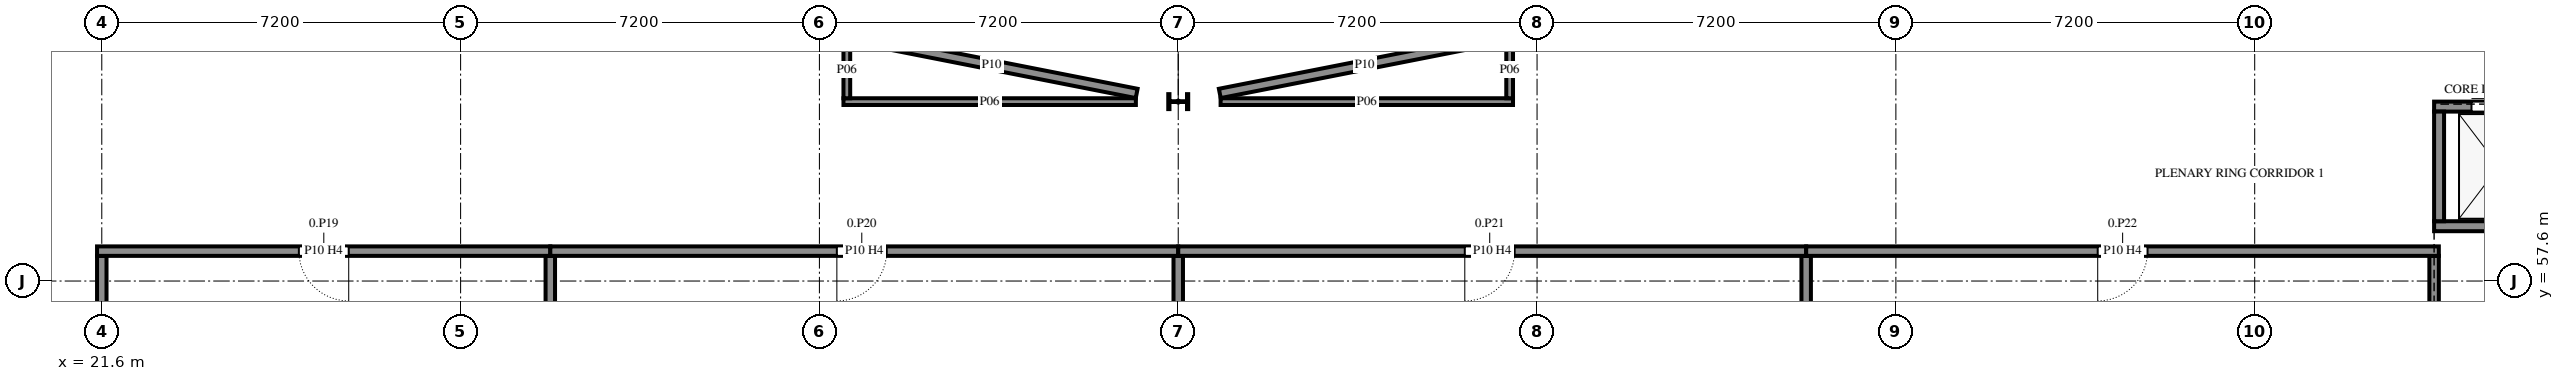
"""IFC4 building model, lengths in metres.
Left out: names, types, materials, properties, quantities, classifications, styles, units other than length and angle.
Written with IfcOpenShell. Run it as: python <this file> out.ifc"""

import sys

from ifc_helpers import new_model, si_unit, direction, frame, frame_2d, origin, origin_2d, place, context, subcontext, project, spatial, rectangle, i_section, extrude, element, fill, save


model = new_model("IFC4")
c1 = context("Model", 3, precision=1e-05, world=origin(), true_north=direction((0.0, 1.0)))
c2 = subcontext(c1, "Body", "Model", "MODEL_VIEW")
j1 = project(units=[si_unit("LENGTHUNIT", "METRE"), si_unit("PLANEANGLEUNIT", "RADIAN")], contexts=[c1])
p1 = place(None, origin())
s1 = spatial("IfcSite", under=j1, at=p1, CompositionType="ELEMENT")
p2 = place(p1, origin())
s2 = spatial("IfcBuilding", under=s1, at=p2, CompositionType="ELEMENT")
p3 = place(p2, origin())
s3 = spatial("IfcBuildingStorey", under=s2, at=p3, CompositionType="ELEMENT", Elevation=0.0)
p4 = place(p3, frame((43.2, 61.2, -0.3), z_axis=(0.0, 0.0, 1.0), x_axis=(0.0, -1.0, 0.0)))
e1 = element("IfcColumn", 1, at=p4, inside=s3, PredefinedType="COLUMN", context=c2, shape_type="SweptSolid", body=[
    extrude(i_section(OverallWidth=0.3, OverallDepth=0.4, WebThickness=0.013, FlangeThickness=0.024, FilletRadius=0.027, at=origin_2d()), origin(), (0.0, 0.0, 1.0), 3.9),
])
p5 = place(p3, frame((68.4, 58.7, -1.4), z_axis=(0.0, 0.0, 1.0), x_axis=(1.0, 0.0, 0.0)))
e2 = element("IfcWall", 2, at=p5, inside=s3, PredefinedType="SHEAR", context=c2, shape_type="SweptSolid", body=[
    extrude(rectangle(XDim=2.6, YDim=0.2, at=frame_2d((1.3, 0.0))), origin(), (0.0, 0.0, 1.0), 5.0),
])
p6 = place(p3, frame((68.4, 61.1, -1.4), z_axis=(0.0, 0.0, 1.0), x_axis=(1.0, 0.0, 0.0)))
e3 = element("IfcWall", 3, at=p6, inside=s3, PredefinedType="SHEAR", context=c2, shape_type="SweptSolid", body=[
    extrude(rectangle(XDim=2.6, YDim=0.2, at=frame_2d((1.3, 0.0))), origin(), (0.0, 0.0, 1.0), 5.0),
])
p7 = place(p6, frame((0.75, 0.0, 1.4)))
e4 = element("IfcOpeningElement", 4, at=p7, cuts=e3, PredefinedType="OPENING", context=c2, shape_type="SweptSolid", body=[
    extrude(rectangle(XDim=1.1, YDim=2.1, at=frame_2d((0.55, 1.05))), frame((0.0, 0.11, 0.0), z_axis=(0.0, -1.0, 0.0), x_axis=(1.0, 0.0, 0.0)), (0.0, 0.0, 1.0), 0.22),
])
p8 = place(p3, frame((68.5, 58.8, -1.4), z_axis=(0.0, 0.0, 1.0), x_axis=(0.0, 1.0, 0.0)))
e5 = element("IfcWall", 5, at=p8, inside=s3, PredefinedType="SHEAR", context=c2, shape_type="SweptSolid", body=[
    extrude(rectangle(XDim=2.2, YDim=0.2, at=frame_2d((1.1, 0.0))), origin(), (0.0, 0.0, 1.0), 5.0),
])
p9 = place(p3, frame((68.4, 57.085, 0.0), z_axis=(0.0, 0.0, 1.0), x_axis=(0.0, 1.0, 0.0)))
e6 = element("IfcWall", 6, at=p9, inside=s3, PredefinedType="PARTITIONING", context=c2, shape_type="SweptSolid", body=[
    extrude(rectangle(XDim=1.02, YDim=0.19, at=frame_2d((0.51, 0.0))), origin(), (0.0, 0.0, 1.0), 3.42),
])
p10 = place(p3, frame((42.366, 61.364, 0.0), z_axis=(0.0, 0.0, 1.0), x_axis=(-0.981165545066, 0.193168768632, 0.0)))
e7 = element("IfcWall", 7, at=p10, inside=s3, PredefinedType="PARTITIONING", context=c2, shape_type="SweptSolid", body=[
    extrude(rectangle(XDim=5.927, YDim=0.19, at=frame_2d((2.964, 0.0))), origin(), (0.0, 0.0, 1.0), 3.06),
])
p11 = place(p3, frame((49.85, 62.509, 0.0), z_axis=(0.0, 0.0, 1.0), x_axis=(-0.981167081846, -0.193160962677, 0.0)))
e8 = element("IfcWall", 8, at=p11, inside=s3, PredefinedType="PARTITIONING", context=c2, shape_type="SweptSolid", body=[
    extrude(rectangle(XDim=5.928, YDim=0.19, at=frame_2d((2.964, 0.0))), origin(), (0.0, 0.0, 1.0), 3.06),
])
p12 = place(p3, frame((30.6, 58.105, 0.0), z_axis=(0.0, 0.0, 1.0), x_axis=(0.0, -1.0, 0.0)))
e9 = element("IfcWall", 9, at=p12, inside=s3, PredefinedType="PARTITIONING", context=c2, shape_type="SweptSolid", body=[
    extrude(rectangle(XDim=7.61, YDim=0.19, at=frame_2d((3.805, 0.0))), origin(), (0.0, 0.0, 1.0), 3.42),
])
p13 = place(p3, frame((21.6, 50.495, 0.0), z_axis=(0.0, 0.0, 1.0), x_axis=(0.0, 1.0, 0.0)))
e10 = element("IfcWall", 10, at=p13, inside=s3, PredefinedType="PARTITIONING", context=c2, shape_type="SweptSolid", body=[
    extrude(rectangle(XDim=7.61, YDim=0.19, at=frame_2d((3.805, 0.0))), origin(), (0.0, 0.0, 1.0), 2.41),
])
p14 = place(p3, frame((21.505, 58.2, 0.0), z_axis=(0.0, 0.0, 1.0), x_axis=(1.0, 0.0, 0.0)))
e11 = element("IfcWall", 11, at=p14, inside=s3, PredefinedType="PARTITIONING", context=c2, shape_type="SweptSolid", body=[
    extrude(rectangle(XDim=9.095, YDim=0.19, at=frame_2d((4.548, 0.0))), origin(), (0.0, 0.0, 1.0), 3.42),
])
p15 = place(p14, frame((4.05, 0.0, 0.0)))
e12 = element("IfcOpeningElement", 12, at=p15, cuts=e11, PredefinedType="OPENING", context=c2, shape_type="SweptSolid", body=[
    extrude(rectangle(XDim=1.0, YDim=2.4, at=frame_2d((0.5, 1.2))), frame((0.0, 0.105, 0.0), z_axis=(0.0, -1.0, 0.0), x_axis=(1.0, 0.0, 0.0)), (0.0, 0.0, 1.0), 0.21),
])
p16 = place(p3, frame((43.2, 58.105, 0.0), z_axis=(0.0, 0.0, 1.0), x_axis=(0.0, -1.0, 0.0)))
e13 = element("IfcWall", 13, at=p16, inside=s3, PredefinedType="PARTITIONING", context=c2, shape_type="SweptSolid", body=[
    extrude(rectangle(XDim=7.61, YDim=0.19, at=frame_2d((3.805, 0.0))), origin(), (0.0, 0.0, 1.0), 3.11),
])
p17 = place(p3, frame((30.6, 58.2, 0.0), z_axis=(0.0, 0.0, 1.0), x_axis=(1.0, 0.0, 0.0)))
e14 = element("IfcWall", 14, at=p17, inside=s3, PredefinedType="PARTITIONING", context=c2, shape_type="SweptSolid", body=[
    extrude(rectangle(XDim=12.6, YDim=0.19, at=frame_2d((6.3, 0.0))), origin(), (0.0, 0.0, 1.0), 3.42),
])
p18 = place(p17, frame((5.75, 0.0, 0.0)))
e15 = element("IfcOpeningElement", 15, at=p18, cuts=e14, PredefinedType="OPENING", context=c2, shape_type="SweptSolid", body=[
    extrude(rectangle(XDim=1.0, YDim=2.4, at=frame_2d((0.5, 1.2))), frame((0.0, 0.105, 0.0), z_axis=(0.0, -1.0, 0.0), x_axis=(1.0, 0.0, 0.0)), (0.0, 0.0, 1.0), 0.21),
])
p19 = place(p3, frame((55.8, 58.105, 0.0), z_axis=(0.0, 0.0, 1.0), x_axis=(0.0, -1.0, 0.0)))
e16 = element("IfcWall", 16, at=p19, inside=s3, PredefinedType="PARTITIONING", context=c2, shape_type="SweptSolid", body=[
    extrude(rectangle(XDim=7.61, YDim=0.19, at=frame_2d((3.805, 0.0))), origin(), (0.0, 0.0, 1.0), 3.42),
])
p20 = place(p3, frame((43.2, 58.2, 0.0), z_axis=(0.0, 0.0, 1.0), x_axis=(1.0, 0.0, 0.0)))
e17 = element("IfcWall", 17, at=p20, inside=s3, PredefinedType="PARTITIONING", context=c2, shape_type="SweptSolid", body=[
    extrude(rectangle(XDim=12.6, YDim=0.19, at=frame_2d((6.3, 0.0))), origin(), (0.0, 0.0, 1.0), 3.42),
])
p21 = place(p20, frame((5.75, 0.0, 0.0)))
e18 = element("IfcOpeningElement", 18, at=p21, cuts=e17, PredefinedType="OPENING", context=c2, shape_type="SweptSolid", body=[
    extrude(rectangle(XDim=1.0, YDim=2.4, at=frame_2d((0.5, 1.2))), frame((0.0, 0.105, 0.0), z_axis=(0.0, -1.0, 0.0), x_axis=(1.0, 0.0, 0.0)), (0.0, 0.0, 1.0), 0.21),
])
p22 = place(p3, frame((55.8, 58.2, 0.0), z_axis=(0.0, 0.0, 1.0), x_axis=(1.0, 0.0, 0.0)))
e19 = element("IfcWall", 19, at=p22, inside=s3, PredefinedType="PARTITIONING", context=c2, shape_type="SweptSolid", body=[
    extrude(rectangle(XDim=12.695, YDim=0.19, at=frame_2d((6.348, 0.0))), origin(), (0.0, 0.0, 1.0), 3.42),
])
p23 = place(p22, frame((5.85, 0.0, 0.0)))
e20 = element("IfcOpeningElement", 20, at=p23, cuts=e19, PredefinedType="OPENING", context=c2, shape_type="SweptSolid", body=[
    extrude(rectangle(XDim=1.0, YDim=2.4, at=frame_2d((0.5, 1.2))), frame((0.0, 0.105, 0.0), z_axis=(0.0, -1.0, 0.0), x_axis=(1.0, 0.0, 0.0)), (0.0, 0.0, 1.0), 0.21),
])
p24 = place(p3, frame((36.482, 61.2, 0.0), z_axis=(0.0, 0.0, 1.0), x_axis=(1.0, 0.0, 0.0)))
e21 = element("IfcWall", 21, at=p24, inside=s3, PredefinedType="PARTITIONING", context=c2, shape_type="SweptSolid", body=[
    extrude(rectangle(XDim=5.868, YDim=0.135, at=frame_2d((2.934, 0.0))), origin(), (0.0, 0.0, 1.0), 3.42),
])
p25 = place(p3, frame((44.05, 61.2, 0.0), z_axis=(0.0, 0.0, 1.0), x_axis=(1.0, 0.0, 0.0)))
e22 = element("IfcWall", 22, at=p25, inside=s3, PredefinedType="PARTITIONING", context=c2, shape_type="SweptSolid", body=[
    extrude(rectangle(XDim=5.867, YDim=0.135, at=frame_2d((2.934, 0.0))), origin(), (0.0, 0.0, 1.0), 3.42),
])
for number, where, z_axis, x_axis in (
    (23, (36.55, 62.414, 0.0), (0.0, 0.0, 1.0), (0.0, -1.0, 0.0)),
    (24, (49.85, 61.268, 0.0), (0.0, 0.0, 1.0), (0.0, 1.0, 0.0)),
):
    element("IfcWall", number, at=place(p3, frame(where, z_axis=z_axis, x_axis=x_axis)), inside=s3, PredefinedType="PARTITIONING", context=c2, shape_type="SweptSolid", body=[
        extrude(rectangle(XDim=1.147, YDim=0.135, at=frame_2d((0.573, 0.0))), origin(), (0.0, 0.0, 1.0), 3.42),
    ])
p26 = place(p7, origin())
e25 = element("IfcDoor", 25, at=p26, inside=s3, OperationType="SLIDING_TO_LEFT", PredefinedType="DOOR", context=c2, shape_type="SweptSolid", body=[
    extrude(rectangle(XDim=1.1, YDim=2.1, at=frame_2d((0.55, 1.05))), frame((0.0, 0.025, 0.0), z_axis=(0.0, -1.0, 0.0), x_axis=(1.0, 0.0, 0.0)), (0.0, 0.0, 1.0), 0.05),
])
fill(e4, e25)
p27 = place(p15, frame((1.0, 0.0, 0.0), z_axis=(0.0, 0.0, 1.0), x_axis=(-1.0, 0.0, 0.0)))
e26 = element("IfcDoor", 26, at=p27, inside=s3, OperationType="SINGLE_SWING_RIGHT", PredefinedType="DOOR", context=c2, shape_type="SweptSolid", body=[
    extrude(rectangle(XDim=1.0, YDim=2.4, at=frame_2d((0.5, 1.2))), frame((0.0, 0.025, 0.0), z_axis=(0.0, -1.0, 0.0), x_axis=(1.0, 0.0, 0.0)), (0.0, 0.0, 1.0), 0.05),
])
fill(e12, e26)
p28 = place(p18, frame((1.0, 0.0, 0.0), z_axis=(0.0, 0.0, 1.0), x_axis=(-1.0, 0.0, 0.0)))
e27 = element("IfcDoor", 27, at=p28, inside=s3, OperationType="SINGLE_SWING_LEFT", PredefinedType="DOOR", context=c2, shape_type="SweptSolid", body=[
    extrude(rectangle(XDim=1.0, YDim=2.4, at=frame_2d((0.5, 1.2))), frame((0.0, 0.025, 0.0), z_axis=(0.0, -1.0, 0.0), x_axis=(1.0, 0.0, 0.0)), (0.0, 0.0, 1.0), 0.05),
])
fill(e15, e27)
p29 = place(p21, frame((1.0, 0.0, 0.0), z_axis=(0.0, 0.0, 1.0), x_axis=(-1.0, 0.0, 0.0)))
e28 = element("IfcDoor", 28, at=p29, inside=s3, OperationType="SINGLE_SWING_LEFT", PredefinedType="DOOR", context=c2, shape_type="SweptSolid", body=[
    extrude(rectangle(XDim=1.0, YDim=2.4, at=frame_2d((0.5, 1.2))), frame((0.0, 0.025, 0.0), z_axis=(0.0, -1.0, 0.0), x_axis=(1.0, 0.0, 0.0)), (0.0, 0.0, 1.0), 0.05),
])
fill(e18, e28)
p30 = place(p23, frame((1.0, 0.0, 0.0), z_axis=(0.0, 0.0, 1.0), x_axis=(-1.0, 0.0, 0.0)))
e29 = element("IfcDoor", 29, at=p30, inside=s3, OperationType="SINGLE_SWING_LEFT", PredefinedType="DOOR", context=c2, shape_type="SweptSolid", body=[
    extrude(rectangle(XDim=1.0, YDim=2.4, at=frame_2d((0.5, 1.2))), frame((0.0, 0.025, 0.0), z_axis=(0.0, -1.0, 0.0), x_axis=(1.0, 0.0, 0.0)), (0.0, 0.0, 1.0), 0.05),
])
fill(e20, e29)
save(model, sys.argv[1])
